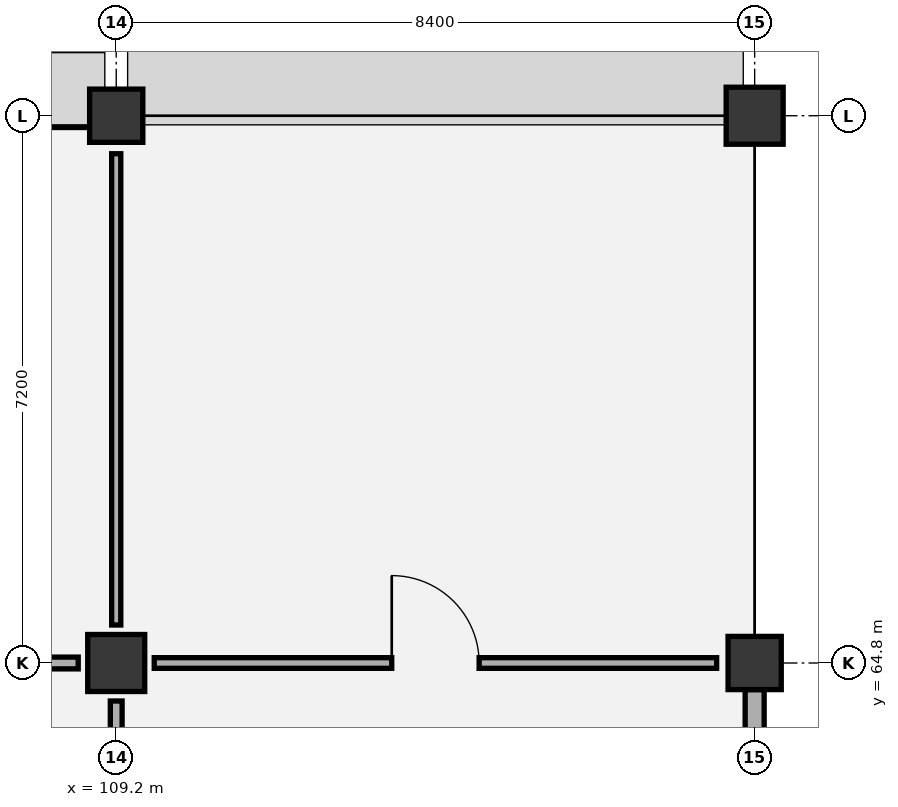
"""IFC4 building model, lengths in metres.
Left out: names, types, materials, properties, quantities, classifications, styles, units other than length and angle.
Written with IfcOpenShell. Run it as: python <this file> out.ifc"""

import sys

from ifc_helpers import new_model, si_unit, direction, frame, frame_2d, origin, origin_2d, place, context, subcontext, project, spatial, rectangle, extrude, element, fill, save


model = new_model("IFC4")
c1 = context("Model", 3, precision=1e-05, world=origin(), true_north=direction((0.0, 1.0)))
c2 = subcontext(c1, "Body", "Model", "MODEL_VIEW")
j1 = project(units=[si_unit("LENGTHUNIT", "METRE"), si_unit("PLANEANGLEUNIT", "RADIAN")], contexts=[c1])
p1 = place(None, origin())
s1 = spatial("IfcSite", under=j1, at=p1, CompositionType="ELEMENT")
p2 = place(p1, origin())
s2 = spatial("IfcBuilding", under=s1, at=p2, CompositionType="ELEMENT")
p3 = place(p2, frame((0.0, 0.0, 43.8)))
s3 = spatial("IfcBuildingStorey", under=s2, at=p3, CompositionType="ELEMENT", Elevation=43.8)
p4 = place(p3, frame((109.2, 64.8, 0.0), z_axis=(0.0, 0.0, 1.0), x_axis=(1.0, 0.0, 0.0)))
e1 = element("IfcColumn", 1, at=p4, inside=s3, PredefinedType="COLUMN", context=c2, shape_type="SweptSolid", body=[
    extrude(rectangle(XDim=0.75, YDim=0.75, at=origin_2d()), origin(), (0.0, 0.0, 1.0), 4.2),
])
for number, where, z_axis, x_axis in (
    (2, (109.2, 72.0, 0.0), (0.0, 0.0, 1.0), (1.0, 0.0, 0.0)),
    (3, (117.6, 64.8, 0.0), (0.0, 0.0, 1.0), (1.0, 0.0, 0.0)),
):
    element("IfcColumn", number, at=place(p3, frame(where, z_axis=z_axis, x_axis=x_axis)), inside=s3, PredefinedType="COLUMN", context=c2, shape_type="SweptSolid", body=[
        extrude(rectangle(XDim=0.7, YDim=0.7, at=origin_2d()), origin(), (0.0, 0.0, 1.0), 4.2),
    ])
p5 = place(p3, frame((117.6, 72.0, 0.0), z_axis=(0.0, 0.0, 1.0), x_axis=(1.0, 0.0, 0.0)))
e4 = element("IfcColumn", 4, at=p5, inside=s3, PredefinedType="COLUMN", context=c2, shape_type="SweptSolid", body=[
    extrude(rectangle(XDim=0.75, YDim=0.75, at=origin_2d()), origin(), (0.0, 0.0, 1.0), 4.2),
])
p6 = place(p3, frame((101.175, 72.0, 0.0), z_axis=(0.0, 0.0, 1.0), x_axis=(1.0, 0.0, 0.0)))
e5 = element("IfcWall", 5, at=p6, inside=s3, PredefinedType="SOLIDWALL", context=c2, shape_type="SweptSolid", body=[
    extrude(rectangle(XDim=7.675, YDim=0.31, at=frame_2d((3.837, 0.0))), origin(), (0.0, 0.0, 1.0), 3.345),
])
p7 = place(p6, frame((1.358, 0.0, 0.95)))
e6 = element("IfcOpeningElement", 6, at=p7, cuts=e5, PredefinedType="OPENING", context=c2, shape_type="SweptSolid", body=[
    extrude(rectangle(XDim=1.8, YDim=1.5, at=frame_2d((0.9, 0.75))), frame((0.0, 0.165, 0.0), z_axis=(0.0, -1.0, 0.0), x_axis=(1.0, 0.0, 0.0)), (0.0, 0.0, 1.0), 0.33),
])
p8 = place(p6, frame((4.517, 0.0, 0.95)))
e7 = element("IfcOpeningElement", 7, at=p8, cuts=e5, PredefinedType="OPENING", context=c2, shape_type="SweptSolid", body=[
    extrude(rectangle(XDim=1.8, YDim=1.5, at=frame_2d((0.9, 0.75))), frame((0.0, 0.165, 0.0), z_axis=(0.0, -1.0, 0.0), x_axis=(1.0, 0.0, 0.0)), (0.0, 0.0, 1.0), 0.33),
])
p9 = place(p3, frame((117.6, 57.975, 0.0), z_axis=(0.0, 0.0, 1.0), x_axis=(0.0, 1.0, 0.0)))
e8 = element("IfcWall", 8, at=p9, inside=s3, PredefinedType="SOLIDWALL", context=c2, shape_type="SweptSolid", body=[
    extrude(rectangle(XDim=6.475, YDim=0.25, at=frame_2d((3.237, 0.0))), origin(), (0.0, 0.0, 1.0), 3.345),
])
p10 = place(p9, frame((1.887, 0.0, 0.95)))
e9 = element("IfcOpeningElement", 9, at=p10, cuts=e8, PredefinedType="OPENING", context=c2, shape_type="SweptSolid", body=[
    extrude(rectangle(XDim=2.7, YDim=1.65, at=frame_2d((1.35, 0.825))), frame((0.0, 0.135, 0.0), z_axis=(0.0, -1.0, 0.0), x_axis=(1.0, 0.0, 0.0)), (0.0, 0.0, 1.0), 0.27),
])
p11 = place(p3, frame((109.2, 58.1, 0.0), z_axis=(0.0, 0.0, 1.0), x_axis=(0.0, 1.0, 0.0)))
e10 = element("IfcWall", 10, at=p11, inside=s3, PredefinedType="PARTITIONING", context=c2, shape_type="SweptSolid", body=[
    extrude(rectangle(XDim=6.2, YDim=0.155, at=frame_2d((3.1, 0.0))), origin(), (0.0, 0.0, 1.0), 3.495),
])
p12 = place(p11, frame((2.55, 0.0, 0.0)))
e11 = element("IfcOpeningElement", 11, at=p12, cuts=e10, PredefinedType="OPENING", context=c2, shape_type="SweptSolid", body=[
    extrude(rectangle(XDim=1.1, YDim=2.1, at=frame_2d((0.55, 1.05))), frame((0.0, 0.087, 0.0), z_axis=(0.0, -1.0, 0.0), x_axis=(1.0, 0.0, 0.0)), (0.0, 0.0, 1.0), 0.175),
])
p13 = place(p3, frame((101.3, 64.8, 0.0), z_axis=(0.0, 0.0, 1.0), x_axis=(1.0, 0.0, 0.0)))
e12 = element("IfcWall", 12, at=p13, inside=s3, PredefinedType="PARTITIONING", context=c2, shape_type="SweptSolid", body=[
    extrude(rectangle(XDim=7.4, YDim=0.155, at=frame_2d((3.7, 0.0))), origin(), (0.0, 0.0, 1.0), 3.445),
])
p14 = place(p13, frame((3.125, 0.0, 0.0)))
e13 = element("IfcOpeningElement", 13, at=p14, cuts=e12, PredefinedType="OPENING", context=c2, shape_type="SweptSolid", body=[
    extrude(rectangle(XDim=1.15, YDim=2.1, at=frame_2d((0.575, 1.05))), frame((0.0, 0.087, 0.0), z_axis=(0.0, -1.0, 0.0), x_axis=(1.0, 0.0, 0.0)), (0.0, 0.0, 1.0), 0.175),
])
p15 = place(p3, frame((109.2, 65.3, 0.0), z_axis=(0.0, 0.0, 1.0), x_axis=(0.0, 1.0, 0.0)))
e14 = element("IfcWall", 14, at=p15, inside=s3, PredefinedType="PARTITIONING", context=c2, shape_type="SweptSolid", body=[
    extrude(rectangle(XDim=6.2, YDim=0.12, at=frame_2d((3.1, 0.0))), origin(), (0.0, 0.0, 1.0), 3.345),
])
p16 = place(p3, frame((109.7, 64.8, 0.0), z_axis=(0.0, 0.0, 1.0), x_axis=(1.0, 0.0, 0.0)))
e15 = element("IfcWall", 15, at=p16, inside=s3, PredefinedType="PARTITIONING", context=c2, shape_type="SweptSolid", body=[
    extrude(rectangle(XDim=7.4, YDim=0.14, at=frame_2d((3.7, 0.0))), origin(), (0.0, 0.0, 1.0), 3.295),
])
p17 = place(p16, frame((3.125, 0.0, 0.0)))
e16 = element("IfcOpeningElement", 16, at=p17, cuts=e15, PredefinedType="OPENING", context=c2, shape_type="SweptSolid", body=[
    extrude(rectangle(XDim=1.15, YDim=2.1, at=frame_2d((0.575, 1.05))), frame((0.0, 0.08, 0.0), z_axis=(0.0, -1.0, 0.0), x_axis=(1.0, 0.0, 0.0)), (0.0, 0.0, 1.0), 0.16),
])
p18 = place(p17, origin())
e17 = element("IfcDoor", 17, at=p18, inside=s3, OperationType="SINGLE_SWING_LEFT", PredefinedType="DOOR", context=c2, shape_type="SweptSolid", body=[
    extrude(rectangle(XDim=1.15, YDim=2.1, at=frame_2d((0.575, 1.05))), frame((0.0, 0.025, 0.0), z_axis=(0.0, -1.0, 0.0), x_axis=(1.0, 0.0, 0.0)), (0.0, 0.0, 1.0), 0.05),
])
fill(e16, e17)
save(model, sys.argv[1])
